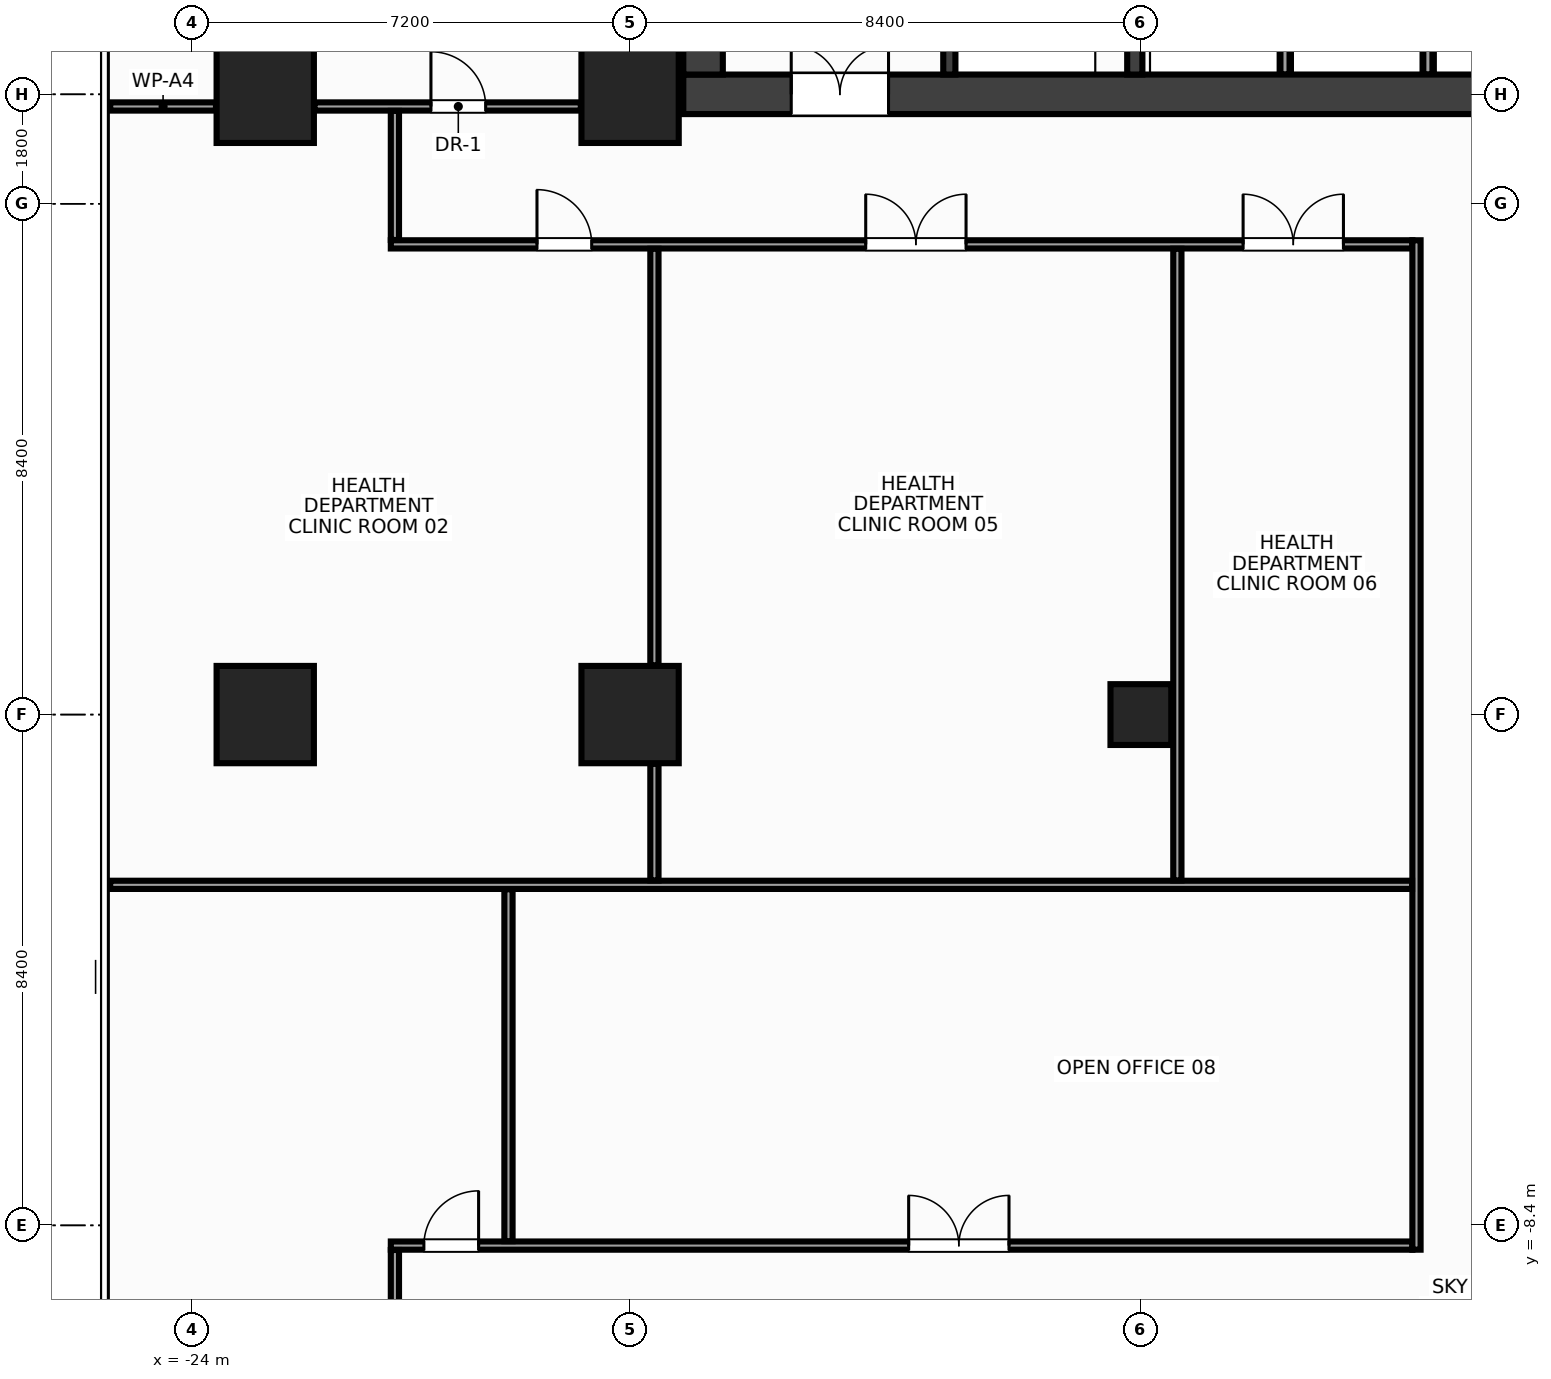
"""IFC4 building model, lengths in metres.
Left out: names, types, materials, properties, quantities, classifications, styles, units other than length and angle.
Written with IfcOpenShell. Run it as: python <this file> out.ifc"""

import sys

from ifc_helpers import new_model, si_unit, direction, frame, frame_2d, origin, origin_2d, place, context, subcontext, project, spatial, rectangle, hollow_rectangle, extrude, source, transform, mapped, element, fill, save


model = new_model("IFC4")
c1 = context("Model", 3, precision=1e-05, world=origin(), true_north=direction((0.0, 1.0)))
c2 = subcontext(c1, "Body", "Model", "MODEL_VIEW")
j1 = project(units=[si_unit("LENGTHUNIT", "METRE"), si_unit("PLANEANGLEUNIT", "RADIAN")], contexts=[c1])
p1 = place(None, origin())
s1 = spatial("IfcSite", under=j1, at=p1, CompositionType="ELEMENT")
p2 = place(p1, origin())
s2 = spatial("IfcBuilding", under=s1, at=p2, CompositionType="ELEMENT")
p3 = place(p2, frame((0.0, 0.0, 77.6)))
s3 = spatial("IfcBuildingStorey", under=s2, at=p3, CompositionType="ELEMENT", Elevation=77.6)
m1 = source(origin(), c2, "Body", "SweptSolid", [
    extrude(rectangle(XDim=31.85, YDim=0.65, at=frame_2d((15.925, 0.0))), origin(), (0.0, 0.0, 1.0), 3.6),
])
p4 = place(p3, frame((-15.925, 10.2, 0.0), z_axis=(0.0, 0.0, 1.0), x_axis=(1.0, 0.0, 0.0)))
e1 = element("IfcWall", 1, at=p4, inside=s3, PredefinedType="SHEAR", context=c2, shape_type="MappedRepresentation", body=[
    mapped(m1, transform((0.0, 0.0, 0.0), x_axis=(1.0, 0.0, 0.0), y_axis=(0.0, 1.0, 0.0), z_axis=(0.0, 0.0, 1.0), scale=1.0)),
])
p5 = place(p4, frame((1.775, 0.0, 0.0)))
e2 = element("IfcOpeningElement", 2, at=p5, cuts=e1, PredefinedType="OPENING", context=c2, shape_type="SweptSolid", body=[
    extrude(rectangle(XDim=1.6, YDim=2.15, at=frame_2d((0.8, 1.075))), frame((0.0, 0.337, 0.0), z_axis=(0.0, -1.0, 0.0), x_axis=(1.0, 0.0, 0.0)), (0.0, 0.0, 1.0), 0.674),
])
p6 = place(p4, frame((28.475, 0.0, 0.0)))
e3 = element("IfcOpeningElement", 3, at=p6, cuts=e1, PredefinedType="OPENING", context=c2, shape_type="SweptSolid", body=[
    extrude(rectangle(XDim=1.6, YDim=2.15, at=frame_2d((0.8, 1.075))), frame((0.0, 0.337, 0.0), z_axis=(0.0, -1.0, 0.0), x_axis=(1.0, 0.0, 0.0)), (0.0, 0.0, 1.0), 0.674),
])
p7 = place(p4, frame((15.175, 0.0, 0.0)))
e4 = element("IfcOpeningElement", 4, at=p7, cuts=e1, PredefinedType="OPENING", context=c2, shape_type="SweptSolid", body=[
    extrude(rectangle(XDim=1.5, YDim=2.2, at=frame_2d((0.75, 1.1))), frame((0.0, 0.337, 0.0), z_axis=(0.0, -1.0, 0.0), x_axis=(1.0, 0.0, 0.0)), (0.0, 0.0, 1.0), 0.674),
])
m2 = source(origin(), c2, "Body", "SweptSolid", [
    extrude(rectangle(XDim=12.95, YDim=0.65, at=frame_2d((6.475, 0.0))), origin(), (0.0, 0.0, 1.0), 3.6),
])
p8 = place(p3, frame((-15.6, 10.525, 0.0), z_axis=(0.0, 0.0, 1.0), x_axis=(0.0, 1.0, 0.0)))
e5 = element("IfcWall", 5, at=p8, inside=s3, PredefinedType="SHEAR", context=c2, shape_type="MappedRepresentation", body=[
    mapped(m2, transform((0.0, 0.0, 0.0), x_axis=(1.0, 0.0, 0.0), y_axis=(0.0, 1.0, 0.0), z_axis=(0.0, 0.0, 1.0), scale=1.0)),
])
m3 = source(origin(), c2, "Body", "SweptSolid", [
    extrude(rectangle(XDim=12.95, YDim=0.25, at=frame_2d((6.475, 0.0))), origin(), (0.0, 0.0, 1.0), 3.6),
])
p9 = place(p3, frame((-8.5, 10.525, 0.0), z_axis=(0.0, 0.0, 1.0), x_axis=(0.0, 1.0, 0.0)))
e6 = element("IfcWall", 6, at=p9, inside=s3, PredefinedType="SHEAR", context=c2, shape_type="MappedRepresentation", body=[
    mapped(m3, transform((0.0, 0.0, 0.0), x_axis=(1.0, 0.0, 0.0), y_axis=(0.0, 1.0, 0.0), z_axis=(0.0, 0.0, 1.0), scale=1.0)),
])
p10 = place(p9, frame((5.075, 0.0, 0.0)))
e7 = element("IfcOpeningElement", 7, at=p10, cuts=e6, PredefinedType="OPENING", context=c2, shape_type="SweptSolid", body=[
    extrude(rectangle(XDim=0.95, YDim=2.15, at=frame_2d((0.475, 1.075))), frame((0.0, 0.137, 0.0), z_axis=(0.0, -1.0, 0.0), x_axis=(1.0, 0.0, 0.0)), (0.0, 0.0, 1.0), 0.274),
])
p11 = place(p9, frame((8.175, 0.0, 0.0)))
e8 = element("IfcOpeningElement", 8, at=p11, cuts=e6, PredefinedType="OPENING", context=c2, shape_type="SweptSolid", body=[
    extrude(rectangle(XDim=0.95, YDim=2.15, at=frame_2d((0.475, 1.075))), frame((0.0, 0.137, 0.0), z_axis=(0.0, -1.0, 0.0), x_axis=(1.0, 0.0, 0.0)), (0.0, 0.0, 1.0), 0.274),
])
m4 = source(origin(), c2, "Body", "SweptSolid", [
    extrude(rectangle(XDim=3.125, YDim=0.2, at=frame_2d((1.562, 0.0))), origin(), (0.0, 0.0, 1.0), 3.6),
])
p12 = place(p3, frame((-11.55, 10.525, 0.0), z_axis=(0.0, 0.0, 1.0), x_axis=(0.0, 1.0, 0.0)))
e9 = element("IfcWall", 9, at=p12, inside=s3, PredefinedType="SHEAR", context=c2, shape_type="MappedRepresentation", body=[
    mapped(m4, transform((0.0, 0.0, 0.0), x_axis=(1.0, 0.0, 0.0), y_axis=(0.0, 1.0, 0.0), z_axis=(0.0, 0.0, 1.0), scale=1.0)),
])
p13 = place(p12, frame((0.9, 0.0, 0.0)))
e10 = element("IfcOpeningElement", 10, at=p13, cuts=e9, PredefinedType="OPENING", context=c2, shape_type="SweptSolid", body=[
    extrude(rectangle(XDim=1.1, YDim=2.15, at=frame_2d((0.55, 1.075))), frame((0.0, 0.112, 0.0), z_axis=(0.0, -1.0, 0.0), x_axis=(1.0, 0.0, 0.0)), (0.0, 0.0, 1.0), 0.224),
])
m5 = source(origin(), c2, "Body", "SweptSolid", [
    extrude(rectangle(XDim=1.6, YDim=1.6, at=origin_2d()), origin(), (0.0, 0.0, 1.0), 3.6),
])
for number, where, z_axis, x_axis in (
    (11, (-16.8, 0.0, 0.0), (0.0, 0.0, 1.0), (1.0, 0.0, 0.0)),
    (12, (-16.8, 10.2, 0.0), (0.0, 0.0, 1.0), (1.0, 0.0, 0.0)),
    (13, (-22.8, 0.0, 0.0), (0.0, 0.0, 1.0), (1.0, 0.0, 0.0)),
    (14, (-22.8, 10.2, 0.0), (0.0, 0.0, 1.0), (1.0, 0.0, 0.0)),
):
    element("IfcColumn", number, at=place(p3, frame(where, z_axis=z_axis, x_axis=x_axis)), inside=s3, PredefinedType="COLUMN", context=c2, shape_type="MappedRepresentation", body=[
        mapped(m5, transform((0.0, 0.0, 0.0), x_axis=(1.0, 0.0, 0.0), y_axis=(0.0, 1.0, 0.0), z_axis=(0.0, 0.0, 1.0), scale=1.0)),
    ])
m6 = source(origin(), c2, "Body", "SweptSolid", [
    extrude(hollow_rectangle(XDim=1.0, YDim=1.0, WallThickness=0.045, at=origin_2d()), origin(), (0.0, 0.0, 1.0), 3.6),
])
p14 = place(p3, frame((-8.4, 0.0, 0.0), z_axis=(0.0, 0.0, 1.0), x_axis=(1.0, 0.0, 0.0)))
e15 = element("IfcColumn", 15, at=p14, inside=s3, PredefinedType="COLUMN", context=c2, shape_type="MappedRepresentation", body=[
    mapped(m6, transform((0.0, 0.0, 0.0), x_axis=(1.0, 0.0, 0.0), y_axis=(0.0, 1.0, 0.0), z_axis=(0.0, 0.0, 1.0), scale=1.0)),
])
m7 = source(origin(), c2, "Body", "SweptSolid", [
    extrude(rectangle(XDim=3.415, YDim=0.15, at=frame_2d((1.708, 0.0))), origin(), (0.0, 0.0, 1.0), 3.36),
])
for number, where, z_axis, x_axis in (
    (16, (-6.03, 10.525, 0.0), (0.0, 0.0, 1.0), (0.0, 1.0, 0.0)),
    (17, (-3.68, 10.525, 0.0), (0.0, 0.0, 1.0), (0.0, 1.0, 0.0)),
):
    element("IfcWall", number, at=place(p3, frame(where, z_axis=z_axis, x_axis=x_axis)), inside=s3, PredefinedType="PARTITIONING", context=c2, shape_type="MappedRepresentation", body=[
        mapped(m7, transform((0.0, 0.0, 0.0), x_axis=(1.0, 0.0, 0.0), y_axis=(0.0, 1.0, 0.0), z_axis=(0.0, 0.0, 1.0), scale=1.0)),
    ])
m8 = source(origin(), c2, "Body", "SweptSolid", [
    extrude(rectangle(XDim=1.74, YDim=0.135, at=frame_2d((0.87, 0.0))), origin(), (0.0, 0.0, 1.0), 3.36),
])
p15 = place(p3, frame((-25.35, 10.0, 0.0), z_axis=(0.0, 0.0, 1.0), x_axis=(1.0, 0.0, 0.0)))
e18 = element("IfcWall", 18, at=p15, inside=s3, PredefinedType="PARTITIONING", context=c2, shape_type="MappedRepresentation", body=[
    mapped(m8, transform((0.0, 0.0, 0.0), x_axis=(1.0, 0.0, 0.0), y_axis=(0.0, 1.0, 0.0), z_axis=(0.0, 0.0, 1.0), scale=1.0)),
])
m9 = source(origin(), c2, "Body", "SweptSolid", [
    extrude(rectangle(XDim=4.38, YDim=0.135, at=frame_2d((2.19, 0.0))), origin(), (0.0, 0.0, 1.0), 2.745),
])
p16 = place(p3, frame((-21.99, 10.0, 0.0), z_axis=(0.0, 0.0, 1.0), x_axis=(1.0, 0.0, 0.0)))
e19 = element("IfcWall", 19, at=p16, inside=s3, PredefinedType="PARTITIONING", context=c2, shape_type="MappedRepresentation", body=[
    mapped(m9, transform((0.0, 0.0, 0.0), x_axis=(1.0, 0.0, 0.0), y_axis=(0.0, 1.0, 0.0), z_axis=(0.0, 0.0, 1.0), scale=1.0)),
])
p17 = place(p16, frame((1.915, 0.0, 0.0)))
e20 = element("IfcOpeningElement", 20, at=p17, cuts=e19, PredefinedType="OPENING", context=c2, shape_type="SweptSolid", body=[
    extrude(rectangle(XDim=0.9, YDim=2.15, at=frame_2d((0.45, 1.075))), frame((0.0, 0.08, 0.0), z_axis=(0.0, -1.0, 0.0), x_axis=(1.0, 0.0, 0.0)), (0.0, 0.0, 1.0), 0.159),
])
m10 = source(origin(), c2, "Body", "SweptSolid", [
    extrude(rectangle(XDim=16.8, YDim=0.135, at=frame_2d((8.4, 0.0))), origin(), (0.0, 0.0, 1.0), 2.745),
])
p18 = place(p3, frame((-20.735, 7.732, 0.0), z_axis=(0.0, 0.0, 1.0), x_axis=(1.0, 0.0, 0.0)))
e21 = element("IfcWall", 21, at=p18, inside=s3, PredefinedType="PARTITIONING", context=c2, shape_type="MappedRepresentation", body=[
    mapped(m10, transform((0.0, 0.0, 0.0), x_axis=(1.0, 0.0, 0.0), y_axis=(0.0, 1.0, 0.0), z_axis=(0.0, 0.0, 1.0), scale=1.0)),
])
p19 = place(p18, frame((2.404, 0.0, 0.0)))
e22 = element("IfcOpeningElement", 22, at=p19, cuts=e21, PredefinedType="OPENING", context=c2, shape_type="SweptSolid", body=[
    extrude(rectangle(XDim=0.9, YDim=2.15, at=frame_2d((0.45, 1.075))), frame((0.0, 0.08, 0.0), z_axis=(0.0, -1.0, 0.0), x_axis=(1.0, 0.0, 0.0)), (0.0, 0.0, 1.0), 0.159),
])
p20 = place(p18, frame((7.81, 0.0, 0.0)))
e23 = element("IfcOpeningElement", 23, at=p20, cuts=e21, PredefinedType="OPENING", context=c2, shape_type="SweptSolid", body=[
    extrude(rectangle(XDim=1.65, YDim=2.35, at=frame_2d((0.825, 1.175))), frame((0.0, 0.08, 0.0), z_axis=(0.0, -1.0, 0.0), x_axis=(1.0, 0.0, 0.0)), (0.0, 0.0, 1.0), 0.159),
])
p21 = place(p18, frame((14.016, 0.0, 0.0)))
e24 = element("IfcOpeningElement", 24, at=p21, cuts=e21, PredefinedType="OPENING", context=c2, shape_type="SweptSolid", body=[
    extrude(rectangle(XDim=1.65, YDim=2.35, at=frame_2d((0.825, 1.175))), frame((0.0, 0.08, 0.0), z_axis=(0.0, -1.0, 0.0), x_axis=(1.0, 0.0, 0.0)), (0.0, 0.0, 1.0), 0.159),
])
p22 = place(p3, frame((-20.735, -8.732, 0.0), z_axis=(0.0, 0.0, 1.0), x_axis=(1.0, 0.0, 0.0)))
e25 = element("IfcWall", 25, at=p22, inside=s3, PredefinedType="PARTITIONING", context=c2, shape_type="MappedRepresentation", body=[
    mapped(m10, transform((0.0, 0.0, 0.0), x_axis=(1.0, 0.0, 0.0), y_axis=(0.0, 1.0, 0.0), z_axis=(0.0, 0.0, 1.0), scale=1.0)),
])
p23 = place(p22, frame((8.516, 0.0, 0.0)))
e26 = element("IfcOpeningElement", 26, at=p23, cuts=e25, PredefinedType="OPENING", context=c2, shape_type="SweptSolid", body=[
    extrude(rectangle(XDim=1.65, YDim=2.35, at=frame_2d((0.825, 1.175))), frame((0.0, 0.08, 0.0), z_axis=(0.0, -1.0, 0.0), x_axis=(1.0, 0.0, 0.0)), (0.0, 0.0, 1.0), 0.159),
])
p24 = place(p22, frame((0.544, 0.0, 0.0)))
e27 = element("IfcOpeningElement", 27, at=p24, cuts=e25, PredefinedType="OPENING", context=c2, shape_type="SweptSolid", body=[
    extrude(rectangle(XDim=0.9, YDim=2.15, at=frame_2d((0.45, 1.075))), frame((0.0, 0.08, 0.0), z_axis=(0.0, -1.0, 0.0), x_axis=(1.0, 0.0, 0.0)), (0.0, 0.0, 1.0), 0.159),
])
m11 = source(origin(), c2, "Body", "SweptSolid", [
    extrude(rectangle(XDim=2.123, YDim=0.135, at=frame_2d((1.061, 0.0))), origin(), (0.0, 0.0, 1.0), 3.36),
])
p25 = place(p3, frame((-20.667, 7.805, 0.0), z_axis=(0.0, 0.0, 1.0), x_axis=(0.0, 1.0, 0.0)))
e28 = element("IfcWall", 28, at=p25, inside=s3, PredefinedType="PARTITIONING", context=c2, shape_type="MappedRepresentation", body=[
    mapped(m11, transform((0.0, 0.0, 0.0), x_axis=(1.0, 0.0, 0.0), y_axis=(0.0, 1.0, 0.0), z_axis=(0.0, 0.0, 1.0), scale=1.0)),
])
m12 = source(origin(), c2, "Body", "SweptSolid", [
    extrude(rectangle(XDim=16.6, YDim=0.135, at=frame_2d((8.3, 0.0))), origin(), (0.0, 0.0, 1.0), 2.645),
])
p26 = place(p3, frame((-3.867, -8.8, 0.0), z_axis=(0.0, 0.0, 1.0), x_axis=(0.0, 1.0, 0.0)))
e29 = element("IfcWall", 29, at=p26, inside=s3, PredefinedType="PARTITIONING", context=c2, shape_type="MappedRepresentation", body=[
    mapped(m12, transform((0.0, 0.0, 0.0), x_axis=(1.0, 0.0, 0.0), y_axis=(0.0, 1.0, 0.0), z_axis=(0.0, 0.0, 1.0), scale=1.0)),
])
m13 = source(origin(), c2, "Body", "SweptSolid", [
    extrude(rectangle(XDim=2.09, YDim=0.135, at=frame_2d((1.045, 0.0))), origin(), (0.0, 0.0, 1.0), 3.36),
])
p27 = place(p3, frame((-20.667, -10.895, 0.0), z_axis=(0.0, 0.0, 1.0), x_axis=(0.0, 1.0, 0.0)))
e30 = element("IfcWall", 30, at=p27, inside=s3, PredefinedType="PARTITIONING", context=c2, shape_type="MappedRepresentation", body=[
    mapped(m13, transform((0.0, 0.0, 0.0), x_axis=(1.0, 0.0, 0.0), y_axis=(0.0, 1.0, 0.0), z_axis=(0.0, 0.0, 1.0), scale=1.0)),
])
m14 = source(origin(), c2, "Body", "SweptSolid", [
    extrude(rectangle(XDim=21.41, YDim=0.135, at=frame_2d((10.705, 0.0))), origin(), (0.0, 0.0, 1.0), 2.745),
])
p28 = place(p3, frame((-25.35, -2.8, 0.0), z_axis=(0.0, 0.0, 1.0), x_axis=(1.0, 0.0, 0.0)))
e31 = element("IfcWall", 31, at=p28, inside=s3, PredefinedType="PARTITIONING", context=c2, shape_type="MappedRepresentation", body=[
    mapped(m14, transform((0.0, 0.0, 0.0), x_axis=(1.0, 0.0, 0.0), y_axis=(0.0, 1.0, 0.0), z_axis=(0.0, 0.0, 1.0), scale=1.0)),
])
m15 = source(origin(), c2, "Body", "SweptSolid", [
    extrude(rectangle(XDim=1.917, YDim=0.135, at=frame_2d((0.959, 0.0))), origin(), (0.0, 0.0, 1.0), 3.36),
])
p29 = place(p3, frame((-16.4, -2.728, 0.0), z_axis=(0.0, 0.0, 1.0), x_axis=(0.0, 1.0, 0.0)))
e32 = element("IfcWall", 32, at=p29, inside=s3, PredefinedType="PARTITIONING", context=c2, shape_type="MappedRepresentation", body=[
    mapped(m15, transform((0.0, 0.0, 0.0), x_axis=(1.0, 0.0, 0.0), y_axis=(0.0, 1.0, 0.0), z_axis=(0.0, 0.0, 1.0), scale=1.0)),
])
m16 = source(origin(), c2, "Body", "SweptSolid", [
    extrude(rectangle(XDim=6.85, YDim=0.135, at=frame_2d((3.425, 0.0))), origin(), (0.0, 0.0, 1.0), 2.645),
])
p30 = place(p3, frame((-16.4, 0.81, 0.0), z_axis=(0.0, 0.0, 1.0), x_axis=(0.0, 1.0, 0.0)))
e33 = element("IfcWall", 33, at=p30, inside=s3, PredefinedType="PARTITIONING", context=c2, shape_type="MappedRepresentation", body=[
    mapped(m16, transform((0.0, 0.0, 0.0), x_axis=(1.0, 0.0, 0.0), y_axis=(0.0, 1.0, 0.0), z_axis=(0.0, 0.0, 1.0), scale=1.0)),
])
m17 = source(origin(), c2, "Body", "SweptSolid", [
    extrude(rectangle(XDim=10.387, YDim=0.135, at=frame_2d((5.194, 0.0))), origin(), (0.0, 0.0, 1.0), 2.645),
])
p31 = place(p3, frame((-7.8, -2.728, 0.0), z_axis=(0.0, 0.0, 1.0), x_axis=(0.0, 1.0, 0.0)))
e34 = element("IfcWall", 34, at=p31, inside=s3, PredefinedType="PARTITIONING", context=c2, shape_type="MappedRepresentation", body=[
    mapped(m17, transform((0.0, 0.0, 0.0), x_axis=(1.0, 0.0, 0.0), y_axis=(0.0, 1.0, 0.0), z_axis=(0.0, 0.0, 1.0), scale=1.0)),
])
m18 = source(origin(), c2, "Body", "SweptSolid", [
    extrude(rectangle(XDim=5.787, YDim=0.135, at=frame_2d((2.894, 0.0))), origin(), (0.0, 0.0, 1.0), 3.36),
])
p32 = place(p3, frame((-18.8, -8.66, 0.0), z_axis=(0.0, 0.0, 1.0), x_axis=(0.0, 1.0, 0.0)))
e35 = element("IfcWall", 35, at=p32, inside=s3, PredefinedType="PARTITIONING", context=c2, shape_type="MappedRepresentation", body=[
    mapped(m18, transform((0.0, 0.0, 0.0), x_axis=(1.0, 0.0, 0.0), y_axis=(0.0, 1.0, 0.0), z_axis=(0.0, 0.0, 1.0), scale=1.0)),
])
m19 = source(origin(), c2, "Body", "SweptSolid", [
    extrude(rectangle(XDim=1.6, YDim=2.15, at=frame_2d((0.8, 1.075))), frame((0.0, 0.025, 0.0), z_axis=(0.0, -1.0, 0.0), x_axis=(1.0, 0.0, 0.0)), (0.0, 0.0, 1.0), 0.05),
])
p33 = place(p5, origin())
e36 = element("IfcDoor", 36, at=p33, inside=s3, OperationType="DOUBLE_DOOR_SINGLE_SWING", PredefinedType="DOOR", context=c2, shape_type="MappedRepresentation", body=[
    mapped(m19, transform((0.0, 0.0, 0.0), x_axis=(1.0, 0.0, 0.0), y_axis=(0.0, 1.0, 0.0), z_axis=(0.0, 0.0, 1.0), scale=1.0)),
])
fill(e2, e36)
m20 = source(origin(), c2, "Body", "SweptSolid", [
    extrude(rectangle(XDim=0.9, YDim=2.15, at=frame_2d((0.45, 1.075))), frame((0.0, 0.025, 0.0), z_axis=(0.0, -1.0, 0.0), x_axis=(1.0, 0.0, 0.0)), (0.0, 0.0, 1.0), 0.05),
])
p34 = place(p17, origin())
e37 = element("IfcDoor", 37, at=p34, inside=s3, OperationType="SINGLE_SWING_LEFT", PredefinedType="DOOR", context=c2, shape_type="MappedRepresentation", body=[
    mapped(m20, transform((0.0, 0.0, 0.0), x_axis=(1.0, 0.0, 0.0), y_axis=(0.0, 1.0, 0.0), z_axis=(0.0, 0.0, 1.0), scale=1.0)),
])
fill(e20, e37)
p35 = place(p19, origin())
e38 = element("IfcDoor", 38, at=p35, inside=s3, OperationType="SINGLE_SWING_LEFT", PredefinedType="DOOR", context=c2, shape_type="MappedRepresentation", body=[
    mapped(m20, transform((0.0, 0.0, 0.0), x_axis=(1.0, 0.0, 0.0), y_axis=(0.0, 1.0, 0.0), z_axis=(0.0, 0.0, 1.0), scale=1.0)),
])
fill(e22, e38)
m21 = source(origin(), c2, "Body", "SweptSolid", [
    extrude(rectangle(XDim=1.65, YDim=2.35, at=frame_2d((0.825, 1.175))), frame((0.0, 0.025, 0.0), z_axis=(0.0, -1.0, 0.0), x_axis=(1.0, 0.0, 0.0)), (0.0, 0.0, 1.0), 0.05),
])
p36 = place(p20, origin())
e39 = element("IfcDoor", 39, at=p36, inside=s3, OperationType="DOUBLE_DOOR_SINGLE_SWING", PredefinedType="DOOR", context=c2, shape_type="MappedRepresentation", body=[
    mapped(m21, transform((0.0, 0.0, 0.0), x_axis=(1.0, 0.0, 0.0), y_axis=(0.0, 1.0, 0.0), z_axis=(0.0, 0.0, 1.0), scale=1.0)),
])
fill(e23, e39)
p37 = place(p21, origin())
e40 = element("IfcDoor", 40, at=p37, inside=s3, OperationType="DOUBLE_DOOR_SINGLE_SWING", PredefinedType="DOOR", context=c2, shape_type="MappedRepresentation", body=[
    mapped(m21, transform((0.0, 0.0, 0.0), x_axis=(1.0, 0.0, 0.0), y_axis=(0.0, 1.0, 0.0), z_axis=(0.0, 0.0, 1.0), scale=1.0)),
])
fill(e24, e40)
p38 = place(p23, origin())
e41 = element("IfcDoor", 41, at=p38, inside=s3, OperationType="DOUBLE_DOOR_SINGLE_SWING", PredefinedType="DOOR", context=c2, shape_type="MappedRepresentation", body=[
    mapped(m21, transform((0.0, 0.0, 0.0), x_axis=(1.0, 0.0, 0.0), y_axis=(0.0, 1.0, 0.0), z_axis=(0.0, 0.0, 1.0), scale=1.0)),
])
fill(e26, e41)
p39 = place(p24, origin())
e42 = element("IfcDoor", 42, at=p39, inside=s3, OperationType="SINGLE_SWING_RIGHT", PredefinedType="DOOR", context=c2, shape_type="MappedRepresentation", body=[
    mapped(m20, transform((0.0, 0.0, 0.0), x_axis=(1.0, 0.0, 0.0), y_axis=(0.0, 1.0, 0.0), z_axis=(0.0, 0.0, 1.0), scale=1.0)),
])
fill(e27, e42)
save(model, sys.argv[1])
